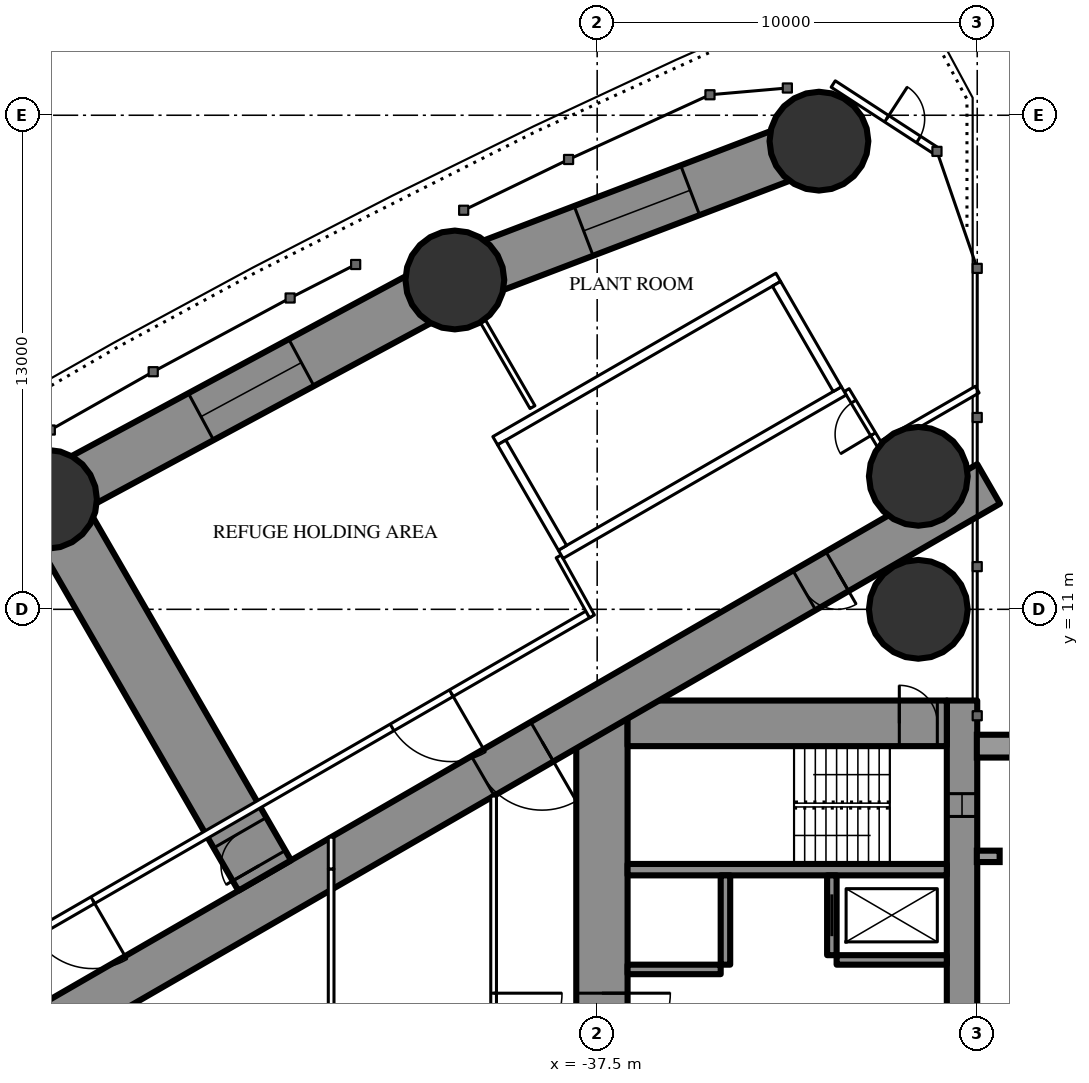
"""IFC4 building model, lengths in metres.
Left out: names, types, materials, properties, quantities, classifications, styles, units other than length and angle.
Written with IfcOpenShell. Run it as: python <this file> out.ifc"""

import sys

from ifc_helpers import new_model, si_unit, direction, frame, frame_2d, origin, origin_2d, place, context, subcontext, project, spatial, rectangle, hollow_circle, extrude, element, fill, save


model = new_model("IFC4")
c1 = context("Model", 3, precision=1e-05, world=origin(), true_north=direction((0.0, 1.0)))
c2 = subcontext(c1, "Body", "Model", "MODEL_VIEW")
j1 = project(units=[si_unit("LENGTHUNIT", "METRE"), si_unit("PLANEANGLEUNIT", "RADIAN")], contexts=[c1])
p1 = place(None, origin())
s1 = spatial("IfcSite", under=j1, at=p1, CompositionType="ELEMENT")
p2 = place(p1, origin())
s2 = spatial("IfcBuilding", under=s1, at=p2, CompositionType="ELEMENT")
p3 = place(p2, frame((0.0, 0.0, 87.0)))
s3 = spatial("IfcBuildingStorey", under=s2, at=p3, CompositionType="ELEMENT", Elevation=87.0)
for number, where, z_axis, x_axis in (
    (1, (-31.665, 23.318, 0.0), (0.0, 0.0, 1.0), (1.0, 0.0, 0.0)),
    (2, (-29.05, 11.0, 0.0), (0.0, 0.0, 1.0), (1.0, 0.0, 0.0)),
    (3, (-29.05, 14.5, 0.0), (0.0, 0.0, 1.0), (1.0, 0.0, 0.0)),
    (4, (-41.245, 19.666, 0.0), (0.0, 0.0, 1.0), (1.0, 0.0, 0.0)),
    (5, (-51.963, 13.895, 0.0), (0.0, 0.0, 1.0), (1.0, 0.0, 0.0)),
):
    element("IfcColumn", number, at=place(p3, frame(where, z_axis=z_axis, x_axis=x_axis)), inside=s3, PredefinedType="COLUMN", context=c2, shape_type="SweptSolid", body=[
        extrude(hollow_circle(Radius=1.3, WallThickness=0.1, at=origin_2d()), origin(), (0.0, 0.0, 1.0), 3.6),
    ])
p4 = place(p3, frame((-27.9, 8.6, 0.0), z_axis=(0.0, 0.0, 1.0), x_axis=(0.0, -1.0, 0.0)))
e6 = element("IfcWall", 6, at=p4, inside=s3, PredefinedType="SHEAR", context=c2, shape_type="SweptSolid", body=[
    extrude(rectangle(XDim=17.2, YDim=0.8, at=frame_2d((8.6, 0.0))), origin(), (0.0, 0.0, 1.0), 3.6),
])
p5 = place(p4, frame((2.45, 0.0, 0.6)))
e7 = element("IfcOpeningElement", 7, at=p5, cuts=e6, PredefinedType="OPENING", context=c2, shape_type="SweptSolid", body=[
    extrude(rectangle(XDim=0.6, YDim=2.1, at=frame_2d((0.3, 1.05))), frame((0.0, 0.41, 0.0), z_axis=(0.0, -1.0, 0.0), x_axis=(1.0, 0.0, 0.0)), (0.0, 0.0, 1.0), 0.82),
])
p6 = place(p4, frame((14.15, 0.0, 0.6)))
e8 = element("IfcOpeningElement", 8, at=p6, cuts=e6, PredefinedType="OPENING", context=c2, shape_type="SweptSolid", body=[
    extrude(rectangle(XDim=0.6, YDim=2.1, at=frame_2d((0.3, 1.05))), frame((0.0, 0.41, 0.0), z_axis=(0.0, -1.0, 0.0), x_axis=(1.0, 0.0, 0.0)), (0.0, 0.0, 1.0), 0.82),
])
p7 = place(p3, frame((-37.375, 8.6, 0.0), z_axis=(0.0, 0.0, 1.0), x_axis=(0.0, -1.0, 0.0)))
e9 = element("IfcWall", 9, at=p7, inside=s3, PredefinedType="SHEAR", context=c2, shape_type="SweptSolid", body=[
    extrude(rectangle(XDim=17.2, YDim=1.35, at=frame_2d((8.6, 0.0))), origin(), (0.0, 0.0, 1.0), 3.6),
])
p8 = place(p7, frame((7.7, 0.0, 0.0)))
e10 = element("IfcOpeningElement", 10, at=p8, cuts=e9, PredefinedType="OPENING", context=c2, shape_type="SweptSolid", body=[
    extrude(rectangle(XDim=1.8, YDim=2.2, at=frame_2d((0.9, 1.1))), frame((0.0, 0.685, 0.0), z_axis=(0.0, -1.0, 0.0), x_axis=(1.0, 0.0, 0.0)), (0.0, 0.0, 1.0), 1.37),
])
p9 = place(p3, frame((-28.3, 8.0, 0.0), z_axis=(0.0, 0.0, 1.0), x_axis=(-1.0, 0.0, 0.0)))
e11 = element("IfcWall", 11, at=p9, inside=s3, PredefinedType="SHEAR", context=c2, shape_type="SweptSolid", body=[
    extrude(rectangle(XDim=8.4, YDim=1.2, at=frame_2d((4.2, 0.0))), origin(), (0.0, 0.0, 1.0), 3.6),
])
p10 = place(p9, frame((0.25, 0.0, 0.0)))
e12 = element("IfcOpeningElement", 12, at=p10, cuts=e11, PredefinedType="OPENING", context=c2, shape_type="SweptSolid", body=[
    extrude(rectangle(XDim=1.0, YDim=2.2, at=frame_2d((0.5, 1.1))), frame((0.0, 0.61, 0.0), z_axis=(0.0, -1.0, 0.0), x_axis=(1.0, 0.0, 0.0)), (0.0, 0.0, 1.0), 1.22),
])
p11 = place(p3, frame((-28.3, 4.15, 0.0), z_axis=(0.0, 0.0, 1.0), x_axis=(-1.0, 0.0, 0.0)))
e13 = element("IfcWall", 13, at=p11, inside=s3, PredefinedType="SHEAR", context=c2, shape_type="SweptSolid", body=[
    extrude(rectangle(XDim=8.4, YDim=0.3, at=frame_2d((4.2, 0.0))), origin(), (0.0, 0.0, 1.0), 3.6),
])
p12 = place(p3, frame((-31.325, 4.0, 0.0), z_axis=(0.0, 0.0, 1.0), x_axis=(0.0, -1.0, 0.0)))
e14 = element("IfcWall", 14, at=p12, inside=s3, PredefinedType="SHEAR", context=c2, shape_type="SweptSolid", body=[
    extrude(rectangle(XDim=2.1, YDim=0.25, at=frame_2d((1.05, 0.0))), origin(), (0.0, 0.0, 1.0), 3.6),
])
p13 = place(p12, frame((0.5, 0.0, 0.0)))
e15 = element("IfcOpeningElement", 15, at=p13, cuts=e14, PredefinedType="OPENING", context=c2, shape_type="SweptSolid", body=[
    extrude(rectangle(XDim=1.1, YDim=2.2, at=frame_2d((0.55, 1.1))), frame((0.0, 0.135, 0.0), z_axis=(0.0, -1.0, 0.0), x_axis=(1.0, 0.0, 0.0)), (0.0, 0.0, 1.0), 0.27),
])
p14 = place(p3, frame((-34.125, 4.0, 0.0), z_axis=(0.0, 0.0, 1.0), x_axis=(0.0, -1.0, 0.0)))
e16 = element("IfcWall", 16, at=p14, inside=s3, PredefinedType="SHEAR", context=c2, shape_type="SweptSolid", body=[
    extrude(rectangle(XDim=2.35, YDim=0.25, at=frame_2d((1.175, 0.0))), origin(), (0.0, 0.0, 1.0), 3.6),
])
p15 = place(p3, frame((-28.3, 1.775, 0.0), z_axis=(0.0, 0.0, 1.0), x_axis=(-1.0, 0.0, 0.0)))
e17 = element("IfcWall", 17, at=p15, inside=s3, PredefinedType="SHEAR", context=c2, shape_type="SweptSolid", body=[
    extrude(rectangle(XDim=2.9, YDim=0.25, at=frame_2d((1.45, 0.0))), origin(), (0.0, 0.0, 1.0), 3.6),
])
p16 = place(p3, frame((-34.25, 1.525, 0.0), z_axis=(0.0, 0.0, 1.0), x_axis=(-1.0, 0.0, 0.0)))
e18 = element("IfcWall", 18, at=p16, inside=s3, PredefinedType="SHEAR", context=c2, shape_type="SweptSolid", body=[
    extrude(rectangle(XDim=2.45, YDim=0.25, at=frame_2d((1.225, 0.0))), origin(), (0.0, 0.0, 1.0), 3.6),
])
p17 = place(p3, frame((-27.2, 14.3, 0.0), z_axis=(0.0, 0.0, 1.0), x_axis=(-0.866026593062, -0.499997940104, 0.0)))
e19 = element("IfcWall", 19, at=p17, inside=s3, PredefinedType="SHEAR", context=c2, shape_type="SweptSolid", body=[
    extrude(rectangle(XDim=28.946, YDim=1.2, at=frame_2d((14.473, 0.0))), origin(), (0.0, 0.0, 1.0), 3.6),
])
p18 = place(p17, frame((4.6, 0.0, 0.0)))
e20 = element("IfcOpeningElement", 20, at=p18, cuts=e19, PredefinedType="OPENING", context=c2, shape_type="SweptSolid", body=[
    extrude(rectangle(XDim=1.0, YDim=2.2, at=frame_2d((0.5, 1.1))), frame((0.0, 0.61, 0.0), z_axis=(0.0, -1.0, 0.0), x_axis=(1.0, 0.0, 0.0)), (0.0, 0.0, 1.0), 1.22),
])
p19 = place(p17, frame((13.568, 0.0, 0.0)))
e21 = element("IfcOpeningElement", 21, at=p19, cuts=e19, PredefinedType="OPENING", context=c2, shape_type="SweptSolid", body=[
    extrude(rectangle(XDim=1.8, YDim=2.03, at=frame_2d((0.9, 1.015))), frame((0.0, 0.61, 0.0), z_axis=(0.0, -1.0, 0.0), x_axis=(1.0, 0.0, 0.0)), (0.0, 0.0, 1.0), 1.22),
])
p20 = place(p3, frame((-46.248, 3.996, 0.0), z_axis=(0.0, 0.0, 1.0), x_axis=(-0.499993613132, 0.866029091213, 0.0)))
e22 = element("IfcWall", 22, at=p20, inside=s3, PredefinedType="SHEAR", context=c2, shape_type="SweptSolid", body=[
    extrude(rectangle(XDim=11.431, YDim=1.6, at=frame_2d((5.715, 0.0))), origin(), (0.0, 0.0, 1.0), 3.6),
])
p21 = place(p20, frame((0.3, 0.0, 0.0)))
e23 = element("IfcOpeningElement", 23, at=p21, cuts=e22, PredefinedType="OPENING", context=c2, shape_type="SweptSolid", body=[
    extrude(rectangle(XDim=1.0, YDim=2.2, at=frame_2d((0.5, 1.1))), frame((0.0, 0.81, 0.0), z_axis=(0.0, -1.0, 0.0), x_axis=(1.0, 0.0, 0.0)), (0.0, 0.0, 1.0), 1.62),
])
p22 = place(p3, frame((-31.665, 23.318, 0.0), z_axis=(0.0, 0.0, 1.0), x_axis=(-0.934392266213, -0.356245832033, 0.0)))
e24 = element("IfcWall", 24, at=p22, inside=s3, PredefinedType="SHEAR", context=c2, shape_type="SweptSolid", body=[
    extrude(rectangle(XDim=10.253, YDim=1.4, at=frame_2d((5.126, 0.0))), origin(), (0.0, 0.0, 1.0), 3.6),
])
p23 = place(p22, frame((3.626, 0.0, 0.6)))
e25 = element("IfcOpeningElement", 25, at=p23, cuts=e24, PredefinedType="OPENING", context=c2, shape_type="SweptSolid", body=[
    extrude(rectangle(XDim=3.0, YDim=1.2, at=frame_2d((1.5, 0.6))), frame((0.0, 0.71, 0.0), z_axis=(0.0, -1.0, 0.0), x_axis=(1.0, 0.0, 0.0)), (0.0, 0.0, 1.0), 1.42),
])
p24 = place(p3, frame((-41.245, 19.666, 0.0), z_axis=(0.0, 0.0, 1.0), x_axis=(-0.880492350889, -0.474060354835, 0.0)))
e26 = element("IfcWall", 26, at=p24, inside=s3, PredefinedType="SHEAR", context=c2, shape_type="SweptSolid", body=[
    extrude(rectangle(XDim=12.173, YDim=1.4, at=frame_2d((6.086, 0.0))), origin(), (0.0, 0.0, 1.0), 3.6),
])
p25 = place(p24, frame((4.586, 0.0, 0.6)))
e27 = element("IfcOpeningElement", 27, at=p25, cuts=e26, PredefinedType="OPENING", context=c2, shape_type="SweptSolid", body=[
    extrude(rectangle(XDim=3.0, YDim=1.2, at=frame_2d((1.5, 0.6))), frame((0.0, 0.71, 0.0), z_axis=(0.0, -1.0, 0.0), x_axis=(1.0, 0.0, 0.0)), (0.0, 0.0, 1.0), 1.42),
])
p26 = place(p3, frame((-51.963, 13.895, 0.0), z_axis=(0.0, 0.0, 1.0), x_axis=(-0.848062521637, -0.529896177939, 0.0)))
e28 = element("IfcWall", 28, at=p26, inside=s3, PredefinedType="SHEAR", context=c2, shape_type="SweptSolid", body=[
    extrude(rectangle(XDim=12.173, YDim=1.4, at=frame_2d((6.086, 0.0))), origin(), (0.0, 0.0, 1.0), 3.6),
])
p27 = place(p26, frame((4.586, 0.0, 0.6)))
e29 = element("IfcOpeningElement", 29, at=p27, cuts=e28, PredefinedType="OPENING", context=c2, shape_type="SweptSolid", body=[
    extrude(rectangle(XDim=3.0, YDim=1.2, at=frame_2d((1.5, 0.6))), frame((0.0, 0.71, 0.0), z_axis=(0.0, -1.0, 0.0), x_axis=(1.0, 0.0, 0.0)), (0.0, 0.0, 1.0), 1.42),
])
p28 = place(p3, frame((-31.289, 24.822, 0.0), z_axis=(0.0, 0.0, 1.0), x_axis=(0.838602944288, -0.544743152166, 0.0)))
e30 = element("IfcWall", 30, at=p28, inside=s3, PredefinedType="STANDARD", context=c2, shape_type="SweptSolid", body=[
    extrude(rectangle(XDim=3.255, YDim=0.2, at=frame_2d((1.627, 0.0))), origin(), (0.0, 0.0, 1.0), 3.35),
])
p29 = place(p28, frame((1.678, 0.0, 0.0)))
e31 = element("IfcOpeningElement", 31, at=p29, cuts=e30, PredefinedType="OPENING", context=c2, shape_type="SweptSolid", body=[
    extrude(rectangle(XDim=1.0, YDim=2.2, at=frame_2d((0.5, 1.1))), frame((0.0, 0.11, 0.0), z_axis=(0.0, -1.0, 0.0), x_axis=(1.0, 0.0, 0.0)), (0.0, 0.0, 1.0), 0.22),
])
p30 = place(p3, frame((-39.202, 16.32, 0.0), z_axis=(0.0, 0.0, 1.0), x_axis=(-0.499947391036, 0.866055775454, 0.0)))
e32 = element("IfcWall", 32, at=p30, inside=s3, PredefinedType="PARTITIONING", context=c2, shape_type="SweptSolid", body=[
    extrude(rectangle(XDim=2.599, YDim=0.15, at=frame_2d((1.3, 0.0))), origin(), (0.0, 0.0, 1.0), 3.35),
])
p31 = place(p3, frame((-27.5, 16.782, 0.0), z_axis=(0.0, 0.0, 1.0), x_axis=(-0.866045812642, -0.499964649156, 0.0)))
e33 = element("IfcWall", 33, at=p31, inside=s3, PredefinedType="PARTITIONING", context=c2, shape_type="SweptSolid", body=[
    extrude(rectangle(XDim=2.938, YDim=0.2, at=frame_2d((1.469, 0.0))), origin(), (0.0, 0.0, 1.0), 3.35),
])
p32 = place(p3, frame((-37.7, 10.894, 0.0), z_axis=(0.0, 0.0, 1.0), x_axis=(-0.866027905338, -0.499995667157, 0.0)))
e34 = element("IfcWall", 34, at=p32, inside=s3, PredefinedType="PARTITIONING", context=c2, shape_type="SweptSolid", body=[
    extrude(rectangle(XDim=21.787, YDim=0.2, at=frame_2d((10.894, 0.0))), origin(), (0.0, 0.0, 1.0), 3.35),
])
p33 = place(p32, frame((15.094, 0.0, 0.0)))
e35 = element("IfcOpeningElement", 35, at=p33, cuts=e34, PredefinedType="OPENING", context=c2, shape_type="SweptSolid", body=[
    extrude(rectangle(XDim=1.8, YDim=2.2, at=frame_2d((0.9, 1.1))), frame((0.0, 0.11, 0.0), z_axis=(0.0, -1.0, 0.0), x_axis=(1.0, 0.0, 0.0)), (0.0, 0.0, 1.0), 0.22),
])
p34 = place(p32, frame((4.201, 0.0, 0.0)))
e36 = element("IfcOpeningElement", 36, at=p34, cuts=e34, PredefinedType="OPENING", context=c2, shape_type="SweptSolid", body=[
    extrude(rectangle(XDim=1.8, YDim=2.2, at=frame_2d((0.9, 1.1))), frame((0.0, 0.11, 0.0), z_axis=(0.0, -1.0, 0.0), x_axis=(1.0, 0.0, 0.0)), (0.0, 0.0, 1.0), 0.22),
])
p35 = place(p3, frame((-30.007, 15.219, 0.0), z_axis=(0.0, 0.0, 1.0), x_axis=(-0.514296815006, 0.857612258585, 0.0)))
e37 = element("IfcWall", 37, at=p35, inside=s3, PredefinedType="PARTITIONING", context=c2, shape_type="SweptSolid", body=[
    extrude(rectangle(XDim=1.805, YDim=0.15, at=frame_2d((0.902, 0.0))), origin(), (0.0, 0.0, 1.0), 2.3),
])
p36 = place(p35, frame((0.452, 0.0, 0.0)))
e38 = element("IfcOpeningElement", 38, at=p36, cuts=e37, PredefinedType="OPENING", context=c2, shape_type="SweptSolid", body=[
    extrude(rectangle(XDim=1.0, YDim=2.03, at=frame_2d((0.5, 1.015))), frame((0.0, 0.085, 0.0), z_axis=(0.0, -1.0, 0.0), x_axis=(1.0, 0.0, 0.0)), (0.0, 0.0, 1.0), 0.17),
])
p37 = place(p3, frame((-38.513, 12.392, 0.0), z_axis=(0.0, 0.0, 1.0), x_axis=(0.485585508183, -0.874189175317, 0.0)))
e39 = element("IfcWall", 39, at=p37, inside=s3, PredefinedType="PARTITIONING", context=c2, shape_type="SweptSolid", body=[
    extrude(rectangle(XDim=1.805, YDim=0.15, at=frame_2d((0.902, 0.0))), origin(), (0.0, 0.0, 1.0), 3.35),
])
p38 = place(p3, frame((-40.225, 6.087, 0.0), z_axis=(0.0, 0.0, 1.0), x_axis=(0.0, -1.0, 0.0)))
e40 = element("IfcWall", 40, at=p38, inside=s3, PredefinedType="PARTITIONING", context=c2, shape_type="SweptSolid", body=[
    extrude(rectangle(XDim=12.174, YDim=0.15, at=frame_2d((6.087, 0.0))), origin(), (0.0, 0.0, 1.0), 3.35),
])
p39 = place(p38, frame((5.187, 0.0, 0.0)))
e41 = element("IfcOpeningElement", 41, at=p39, cuts=e40, PredefinedType="OPENING", context=c2, shape_type="SweptSolid", body=[
    extrude(rectangle(XDim=1.8, YDim=2.2, at=frame_2d((0.9, 1.1))), frame((0.0, 0.085, 0.0), z_axis=(0.0, -1.0, 0.0), x_axis=(1.0, 0.0, 0.0)), (0.0, 0.0, 1.0), 0.17),
])
p40 = place(p3, frame((-44.5, 4.169, 0.0), z_axis=(0.0, 0.0, 1.0), x_axis=(0.0, -1.0, 0.0)))
e42 = element("IfcWall", 42, at=p40, inside=s3, PredefinedType="PARTITIONING", context=c2, shape_type="SweptSolid", body=[
    extrude(rectangle(XDim=9.173, YDim=0.15, at=frame_2d((4.587, 0.0))), origin(), (0.0, 0.0, 1.0), 3.35),
])
p41 = place(p40, frame((3.669, 0.0, 0.0)))
e43 = element("IfcOpeningElement", 43, at=p41, cuts=e42, PredefinedType="OPENING", context=c2, shape_type="SweptSolid", body=[
    extrude(rectangle(XDim=1.0, YDim=2.2, at=frame_2d((0.5, 1.1))), frame((0.0, 0.085, 0.0), z_axis=(0.0, -1.0, 0.0), x_axis=(1.0, 0.0, 0.0)), (0.0, 0.0, 1.0), 0.17),
])
for number, where, z_axis, x_axis in (
    (44, (-31.01, 16.747, 0.0), (0.0, 0.0, 1.0), (-0.866, -0.5, 0.0)),
    (45, (-32.736, 19.736, 0.0), (0.0, 0.0, 1.0), (-0.866, -0.5, 0.0)),
):
    element("IfcWall", number, at=place(p3, frame(where, z_axis=z_axis, x_axis=x_axis)), inside=s3, PredefinedType="PARTITIONING", context=c2, shape_type="SweptSolid", body=[
        extrude(rectangle(XDim=8.6, YDim=0.25, at=frame_2d((4.3, 0.0))), origin(), (0.0, 0.0, 1.0), 3.35),
    ])
p42 = place(p3, frame((-31.181, 16.793, 0.0), z_axis=(0.0, 0.0, 1.0), x_axis=(-0.499929347863, 0.866066190972, 0.0)))
e46 = element("IfcWall", 46, at=p42, inside=s3, PredefinedType="PARTITIONING", context=c2, shape_type="SweptSolid", body=[
    extrude(rectangle(XDim=3.201, YDim=0.25, at=frame_2d((1.6, 0.0))), origin(), (0.0, 0.0, 1.0), 3.35),
])
p43 = place(p3, frame((-38.413, 12.618, 0.0), z_axis=(0.0, 0.0, 1.0), x_axis=(-0.499872130319, 0.866099216793, 0.0)))
e47 = element("IfcWall", 47, at=p43, inside=s3, PredefinedType="PARTITIONING", context=c2, shape_type="SweptSolid", body=[
    extrude(rectangle(XDim=3.2, YDim=0.25, at=frame_2d((1.6, 0.0))), origin(), (0.0, 0.0, 1.0), 3.35),
])
p44 = place(p3, frame((-44.5, 5.005, 0.0), z_axis=(0.0, 0.0, 1.0), x_axis=(0.0, -1.0, 0.0)))
e48 = element("IfcWall", 48, at=p44, inside=s3, PredefinedType="PARTITIONING", context=c2, shape_type="SweptSolid", body=[
    extrude(rectangle(XDim=0.836, YDim=0.15, at=frame_2d((0.418, 0.0))), origin(), (0.0, 0.0, 1.0), 2.05),
])
p45 = place(p23, origin())
e49 = element("IfcWindow", 49, at=p45, inside=s3, PartitioningType="SINGLE_PANEL", PredefinedType="WINDOW", context=c2, shape_type="SweptSolid", body=[
    extrude(rectangle(XDim=3.0, YDim=1.2, at=frame_2d((1.5, 0.6))), frame((0.0, 0.03, 0.0), z_axis=(0.0, -1.0, 0.0), x_axis=(1.0, 0.0, 0.0)), (0.0, 0.0, 1.0), 0.06),
])
fill(e25, e49)
p46 = place(p25, origin())
e50 = element("IfcWindow", 50, at=p46, inside=s3, PartitioningType="SINGLE_PANEL", PredefinedType="WINDOW", context=c2, shape_type="SweptSolid", body=[
    extrude(rectangle(XDim=3.0, YDim=1.2, at=frame_2d((1.5, 0.6))), frame((0.0, 0.03, 0.0), z_axis=(0.0, -1.0, 0.0), x_axis=(1.0, 0.0, 0.0)), (0.0, 0.0, 1.0), 0.06),
])
fill(e27, e50)
p47 = place(p29, origin())
e51 = element("IfcDoor", 51, at=p47, inside=s3, OperationType="SINGLE_SWING_LEFT", PredefinedType="DOOR", context=c2, shape_type="SweptSolid", body=[
    extrude(rectangle(XDim=1.0, YDim=2.2, at=frame_2d((0.5, 1.1))), frame((0.0, 0.025, 0.0), z_axis=(0.0, -1.0, 0.0), x_axis=(1.0, 0.0, 0.0)), (0.0, 0.0, 1.0), 0.05),
])
fill(e31, e51)
p48 = place(p21, origin())
e52 = element("IfcDoor", 52, at=p48, inside=s3, OperationType="SINGLE_SWING_LEFT", PredefinedType="DOOR", context=c2, shape_type="SweptSolid", body=[
    extrude(rectangle(XDim=1.0, YDim=2.2, at=frame_2d((0.5, 1.1))), frame((0.0, 0.025, 0.0), z_axis=(0.0, -1.0, 0.0), x_axis=(1.0, 0.0, 0.0)), (0.0, 0.0, 1.0), 0.05),
])
fill(e23, e52)
p49 = place(p33, origin())
e53 = element("IfcDoor", 53, at=p49, inside=s3, OperationType="DOUBLE_DOOR_SINGLE_SWING", PredefinedType="DOOR", context=c2, shape_type="SweptSolid", body=[
    extrude(rectangle(XDim=1.8, YDim=2.2, at=frame_2d((0.9, 1.1))), frame((0.0, 0.025, 0.0), z_axis=(0.0, -1.0, 0.0), x_axis=(1.0, 0.0, 0.0)), (0.0, 0.0, 1.0), 0.05),
])
fill(e35, e53)
p50 = place(p36, origin())
e54 = element("IfcDoor", 54, at=p50, inside=s3, OperationType="SINGLE_SWING_LEFT", PredefinedType="DOOR", context=c2, shape_type="SweptSolid", body=[
    extrude(rectangle(XDim=1.0, YDim=2.03, at=frame_2d((0.5, 1.015))), frame((0.0, 0.025, 0.0), z_axis=(0.0, -1.0, 0.0), x_axis=(1.0, 0.0, 0.0)), (0.0, 0.0, 1.0), 0.05),
])
fill(e38, e54)
p51 = place(p34, origin())
e55 = element("IfcDoor", 55, at=p51, inside=s3, OperationType="DOUBLE_DOOR_SINGLE_SWING", PredefinedType="DOOR", context=c2, shape_type="SweptSolid", body=[
    extrude(rectangle(XDim=1.8, YDim=2.2, at=frame_2d((0.9, 1.1))), frame((0.0, 0.025, 0.0), z_axis=(0.0, -1.0, 0.0), x_axis=(1.0, 0.0, 0.0)), (0.0, 0.0, 1.0), 0.05),
])
fill(e36, e55)
p52 = place(p39, origin())
e56 = element("IfcDoor", 56, at=p52, inside=s3, OperationType="DOUBLE_DOOR_SINGLE_SWING", PredefinedType="DOOR", context=c2, shape_type="SweptSolid", body=[
    extrude(rectangle(XDim=1.8, YDim=2.2, at=frame_2d((0.9, 1.1))), frame((0.0, 0.025, 0.0), z_axis=(0.0, -1.0, 0.0), x_axis=(1.0, 0.0, 0.0)), (0.0, 0.0, 1.0), 0.05),
])
fill(e41, e56)
p53 = place(p18, origin())
e57 = element("IfcDoor", 57, at=p53, inside=s3, OperationType="SINGLE_SWING_LEFT", PredefinedType="DOOR", context=c2, shape_type="SweptSolid", body=[
    extrude(rectangle(XDim=1.0, YDim=2.2, at=frame_2d((0.5, 1.1))), frame((0.0, 0.025, 0.0), z_axis=(0.0, -1.0, 0.0), x_axis=(1.0, 0.0, 0.0)), (0.0, 0.0, 1.0), 0.05),
])
fill(e20, e57)
p54 = place(p19, origin())
e58 = element("IfcDoor", 58, at=p54, inside=s3, OperationType="DOUBLE_DOOR_SINGLE_SWING", PredefinedType="DOOR", context=c2, shape_type="SweptSolid", body=[
    extrude(rectangle(XDim=1.8, YDim=2.03, at=frame_2d((0.9, 1.015))), frame((0.0, 0.025, 0.0), z_axis=(0.0, -1.0, 0.0), x_axis=(1.0, 0.0, 0.0)), (0.0, 0.0, 1.0), 0.05),
])
fill(e21, e58)
p55 = place(p8, origin())
e59 = element("IfcDoor", 59, at=p55, inside=s3, OperationType="DOUBLE_DOOR_SINGLE_SWING", PredefinedType="DOOR", context=c2, shape_type="SweptSolid", body=[
    extrude(rectangle(XDim=1.8, YDim=2.2, at=frame_2d((0.9, 1.1))), frame((0.0, 0.025, 0.0), z_axis=(0.0, -1.0, 0.0), x_axis=(1.0, 0.0, 0.0)), (0.0, 0.0, 1.0), 0.05),
])
fill(e10, e59)
p56 = place(p10, origin())
e60 = element("IfcDoor", 60, at=p56, inside=s3, OperationType="SINGLE_SWING_RIGHT", PredefinedType="DOOR", context=c2, shape_type="SweptSolid", body=[
    extrude(rectangle(XDim=1.0, YDim=2.2, at=frame_2d((0.5, 1.1))), frame((0.0, 0.025, 0.0), z_axis=(0.0, -1.0, 0.0), x_axis=(1.0, 0.0, 0.0)), (0.0, 0.0, 1.0), 0.05),
])
fill(e12, e60)
p57 = place(p13, origin())
e61 = element("IfcDoor", 61, at=p57, inside=s3, OperationType="SLIDING_TO_LEFT", PredefinedType="USERDEFINED", context=c2, shape_type="SweptSolid", body=[
    extrude(rectangle(XDim=1.1, YDim=2.2, at=frame_2d((0.55, 1.1))), frame((0.0, 0.025, 0.0), z_axis=(0.0, -1.0, 0.0), x_axis=(1.0, 0.0, 0.0)), (0.0, 0.0, 1.0), 0.05),
])
fill(e15, e61)
p58 = place(p5, origin())
e62 = element("IfcWindow", 62, at=p58, inside=s3, PartitioningType="SINGLE_PANEL", PredefinedType="WINDOW", context=c2, shape_type="SweptSolid", body=[
    extrude(rectangle(XDim=0.6, YDim=2.1, at=frame_2d((0.3, 1.05))), frame((0.0, 0.03, 0.0), z_axis=(0.0, -1.0, 0.0), x_axis=(1.0, 0.0, 0.0)), (0.0, 0.0, 1.0), 0.06),
])
fill(e7, e62)
save(model, sys.argv[1])
